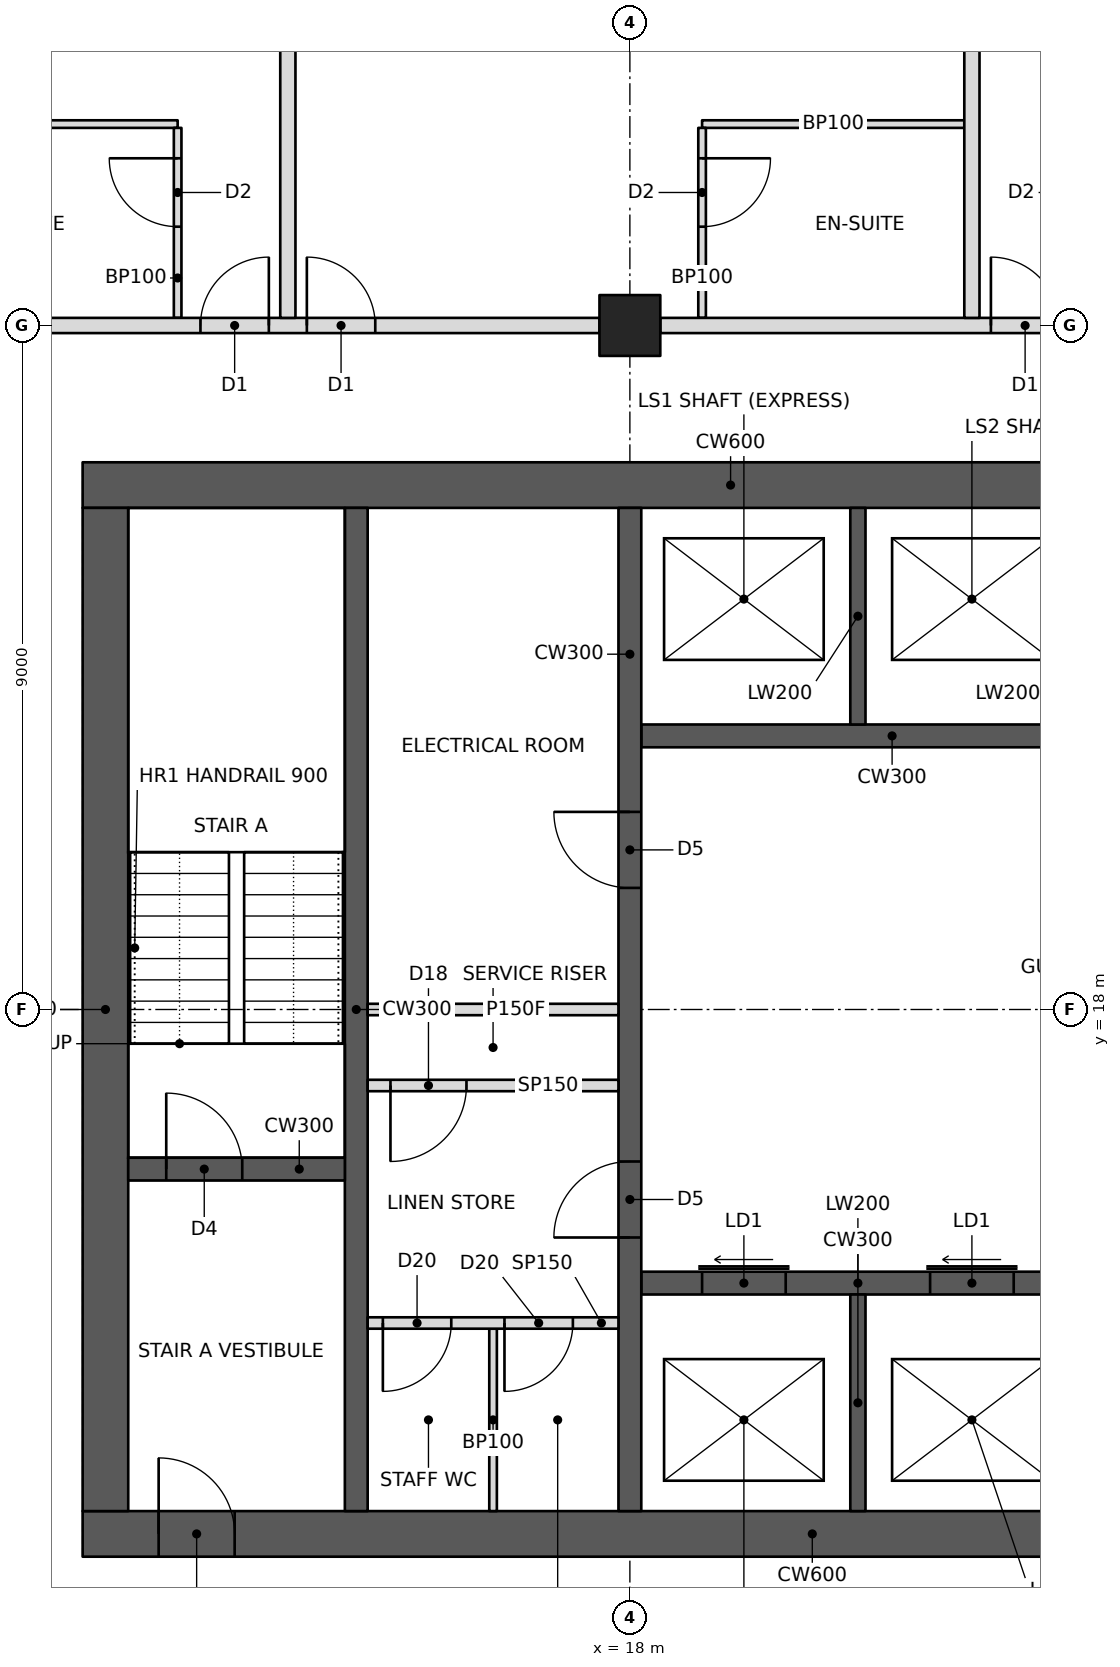
"""IFC4 building model, lengths in metres.
Left out: names, types, materials, properties, quantities, classifications, styles, units other than length and angle.
Written with IfcOpenShell. Run it as: python <this file> out.ifc"""

import sys

from ifc_helpers import new_model, si_unit, direction, frame, frame_2d, origin, origin_2d, place, context, subcontext, project, spatial, rectangle, hollow_rectangle, extrude, element, fill, save


model = new_model("IFC4")
c1 = context("Model", 3, precision=1e-05, world=origin(), true_north=direction((0.0, 1.0)))
c2 = subcontext(c1, "Body", "Model", "MODEL_VIEW")
j1 = project(units=[si_unit("LENGTHUNIT", "METRE"), si_unit("PLANEANGLEUNIT", "RADIAN")], contexts=[c1])
p1 = place(None, origin())
s1 = spatial("IfcSite", under=j1, at=p1, CompositionType="ELEMENT")
p2 = place(p1, origin())
s2 = spatial("IfcBuilding", under=s1, at=p2, CompositionType="ELEMENT")
p3 = place(p2, frame((0.0, 0.0, 51.8)))
s3 = spatial("IfcBuildingStorey", under=s2, at=p3, CompositionType="ELEMENT", Elevation=51.8)
p4 = place(p3, frame((18.0, 27.0, 0.0), z_axis=(0.0, 0.0, 1.0), x_axis=(1.0, 0.0, 0.0)))
e1 = element("IfcColumn", 1, at=p4, inside=s3, PredefinedType="COLUMN", context=c2, shape_type="SweptSolid", body=[
    extrude(hollow_rectangle(XDim=0.8, YDim=0.8, WallThickness=0.1, at=origin_2d()), origin(), (0.0, 0.0, 1.0), 3.4),
])
p5 = place(p3, frame((10.8, 11.1, 0.0), z_axis=(0.0, 0.0, 1.0), x_axis=(1.0, 0.0, 0.0)))
e2 = element("IfcWall", 2, at=p5, inside=s3, PredefinedType="SHEAR", context=c2, shape_type="SweptSolid", body=[
    extrude(rectangle(XDim=23.4, YDim=0.6, at=frame_2d((11.7, 0.0))), origin(), (0.0, 0.0, 1.0), 3.4),
])
p6 = place(p5, frame((1.0, 0.0, 0.0)))
e3 = element("IfcOpeningElement", 3, at=p6, cuts=e2, PredefinedType="OPENING", context=c2, shape_type="SweptSolid", body=[
    extrude(rectangle(XDim=1.0, YDim=2.1, at=frame_2d((0.5, 1.05))), frame((0.0, 0.31, 0.0), z_axis=(0.0, -1.0, 0.0), x_axis=(1.0, 0.0, 0.0)), (0.0, 0.0, 1.0), 0.62),
])
p7 = place(p5, frame((17.2, 0.0, 0.0)))
e4 = element("IfcOpeningElement", 4, at=p7, cuts=e2, PredefinedType="OPENING", context=c2, shape_type="SweptSolid", body=[
    extrude(rectangle(XDim=1.8, YDim=2.1, at=frame_2d((0.9, 1.05))), frame((0.0, 0.31, 0.0), z_axis=(0.0, -1.0, 0.0), x_axis=(1.0, 0.0, 0.0)), (0.0, 0.0, 1.0), 0.62),
])
p8 = place(p3, frame((10.8, 24.9, 0.0), z_axis=(0.0, 0.0, 1.0), x_axis=(1.0, 0.0, 0.0)))
e5 = element("IfcWall", 5, at=p8, inside=s3, PredefinedType="SHEAR", context=c2, shape_type="SweptSolid", body=[
    extrude(rectangle(XDim=23.4, YDim=0.6, at=frame_2d((11.7, 0.0))), origin(), (0.0, 0.0, 1.0), 3.4),
])
p9 = place(p8, frame((17.2, 0.0, 0.0)))
e6 = element("IfcOpeningElement", 6, at=p9, cuts=e5, PredefinedType="OPENING", context=c2, shape_type="SweptSolid", body=[
    extrude(rectangle(XDim=1.8, YDim=2.1, at=frame_2d((0.9, 1.05))), frame((0.0, 0.31, 0.0), z_axis=(0.0, -1.0, 0.0), x_axis=(1.0, 0.0, 0.0)), (0.0, 0.0, 1.0), 0.62),
])
p10 = place(p8, frame((21.1, 0.0, 0.0)))
e7 = element("IfcOpeningElement", 7, at=p10, cuts=e5, PredefinedType="OPENING", context=c2, shape_type="SweptSolid", body=[
    extrude(rectangle(XDim=1.0, YDim=2.1, at=frame_2d((0.5, 1.05))), frame((0.0, 0.31, 0.0), z_axis=(0.0, -1.0, 0.0), x_axis=(1.0, 0.0, 0.0)), (0.0, 0.0, 1.0), 0.62),
])
p11 = place(p3, frame((11.1, 11.4, 0.0), z_axis=(0.0, 0.0, 1.0), x_axis=(0.0, 1.0, 0.0)))
e8 = element("IfcWall", 8, at=p11, inside=s3, PredefinedType="SHEAR", context=c2, shape_type="SweptSolid", body=[
    extrude(rectangle(XDim=13.2, YDim=0.6, at=frame_2d((6.6, 0.0))), origin(), (0.0, 0.0, 1.0), 3.4),
])
p12 = place(p3, frame((14.4, 11.4, 0.0), z_axis=(0.0, 0.0, 1.0), x_axis=(0.0, 1.0, 0.0)))
e9 = element("IfcWall", 9, at=p12, inside=s3, PredefinedType="SHEAR", context=c2, shape_type="SweptSolid", body=[
    extrude(rectangle(XDim=13.2, YDim=0.3, at=frame_2d((6.6, 0.0))), origin(), (0.0, 0.0, 1.0), 3.4),
])
p13 = place(p3, frame((11.4, 15.9, 0.0), z_axis=(0.0, 0.0, 1.0), x_axis=(1.0, 0.0, 0.0)))
e10 = element("IfcWall", 10, at=p13, inside=s3, PredefinedType="SHEAR", context=c2, shape_type="SweptSolid", body=[
    extrude(rectangle(XDim=2.85, YDim=0.3, at=frame_2d((1.425, 0.0))), origin(), (0.0, 0.0, 1.0), 3.4),
])
p14 = place(p13, frame((0.5, 0.0, 0.0)))
e11 = element("IfcOpeningElement", 11, at=p14, cuts=e10, PredefinedType="OPENING", context=c2, shape_type="SweptSolid", body=[
    extrude(rectangle(XDim=1.0, YDim=2.1, at=frame_2d((0.5, 1.05))), frame((0.0, 0.16, 0.0), z_axis=(0.0, -1.0, 0.0), x_axis=(1.0, 0.0, 0.0)), (0.0, 0.0, 1.0), 0.32),
])
p15 = place(p3, frame((18.0, 11.4, 0.0), z_axis=(0.0, 0.0, 1.0), x_axis=(0.0, 1.0, 0.0)))
e12 = element("IfcWall", 12, at=p15, inside=s3, PredefinedType="SHEAR", context=c2, shape_type="SweptSolid", body=[
    extrude(rectangle(XDim=13.2, YDim=0.3, at=frame_2d((6.6, 0.0))), origin(), (0.0, 0.0, 1.0), 3.4),
])
p16 = place(p15, frame((3.6, 0.0, 0.0)))
e13 = element("IfcOpeningElement", 13, at=p16, cuts=e12, PredefinedType="OPENING", context=c2, shape_type="SweptSolid", body=[
    extrude(rectangle(XDim=1.0, YDim=2.1, at=frame_2d((0.5, 1.05))), frame((0.0, 0.16, 0.0), z_axis=(0.0, -1.0, 0.0), x_axis=(1.0, 0.0, 0.0)), (0.0, 0.0, 1.0), 0.32),
])
p17 = place(p15, frame((8.2, 0.0, 0.0)))
e14 = element("IfcOpeningElement", 14, at=p17, cuts=e12, PredefinedType="OPENING", context=c2, shape_type="SweptSolid", body=[
    extrude(rectangle(XDim=1.0, YDim=2.1, at=frame_2d((0.5, 1.05))), frame((0.0, 0.16, 0.0), z_axis=(0.0, -1.0, 0.0), x_axis=(1.0, 0.0, 0.0)), (0.0, 0.0, 1.0), 0.32),
])
p18 = place(p3, frame((14.55, 18.0, 0.0), z_axis=(0.0, 0.0, 1.0), x_axis=(1.0, 0.0, 0.0)))
e15 = element("IfcWall", 15, at=p18, inside=s3, PredefinedType="PARTITIONING", context=c2, shape_type="SweptSolid", body=[
    extrude(rectangle(XDim=3.3, YDim=0.15, at=frame_2d((1.65, 0.0))), origin(), (0.0, 0.0, 1.0), 3.2),
])
p19 = place(p3, frame((18.15, 14.4, 0.0), z_axis=(0.0, 0.0, 1.0), x_axis=(1.0, 0.0, 0.0)))
e16 = element("IfcWall", 16, at=p19, inside=s3, PredefinedType="SHEAR", context=c2, shape_type="SweptSolid", body=[
    extrude(rectangle(XDim=9.0, YDim=0.3, at=frame_2d((4.5, 0.0))), origin(), (0.0, 0.0, 1.0), 3.4),
])
p20 = place(p19, frame((0.8, 0.0, 0.0)))
e17 = element("IfcOpeningElement", 17, at=p20, cuts=e16, PredefinedType="OPENING", context=c2, shape_type="SweptSolid", body=[
    extrude(rectangle(XDim=1.1, YDim=2.1, at=frame_2d((0.55, 1.05))), frame((0.0, 0.16, 0.0), z_axis=(0.0, -1.0, 0.0), x_axis=(1.0, 0.0, 0.0)), (0.0, 0.0, 1.0), 0.32),
])
p21 = place(p19, frame((3.8, 0.0, 0.0)))
e18 = element("IfcOpeningElement", 18, at=p21, cuts=e16, PredefinedType="OPENING", context=c2, shape_type="SweptSolid", body=[
    extrude(rectangle(XDim=1.1, YDim=2.1, at=frame_2d((0.55, 1.05))), frame((0.0, 0.16, 0.0), z_axis=(0.0, -1.0, 0.0), x_axis=(1.0, 0.0, 0.0)), (0.0, 0.0, 1.0), 0.32),
])
p22 = place(p19, frame((6.75, 0.0, 0.0)))
e19 = element("IfcOpeningElement", 19, at=p22, cuts=e16, PredefinedType="OPENING", context=c2, shape_type="SweptSolid", body=[
    extrude(rectangle(XDim=1.2, YDim=2.1, at=frame_2d((0.6, 1.05))), frame((0.0, 0.16, 0.0), z_axis=(0.0, -1.0, 0.0), x_axis=(1.0, 0.0, 0.0)), (0.0, 0.0, 1.0), 0.32),
])
p23 = place(p3, frame((21.0, 11.4, 0.0), z_axis=(0.0, 0.0, 1.0), x_axis=(0.0, 1.0, 0.0)))
e20 = element("IfcWall", 20, at=p23, inside=s3, PredefinedType="SHEAR", context=c2, shape_type="SweptSolid", body=[
    extrude(rectangle(XDim=2.85, YDim=0.2, at=frame_2d((1.425, 0.0))), origin(), (0.0, 0.0, 1.0), 3.4),
])
p24 = place(p3, frame((18.15, 21.6, 0.0), z_axis=(0.0, 0.0, 1.0), x_axis=(1.0, 0.0, 0.0)))
e21 = element("IfcWall", 21, at=p24, inside=s3, PredefinedType="SHEAR", context=c2, shape_type="SweptSolid", body=[
    extrude(rectangle(XDim=9.0, YDim=0.3, at=frame_2d((4.5, 0.0))), origin(), (0.0, 0.0, 1.0), 3.4),
])
p25 = place(p24, frame((6.75, 0.0, 0.0)))
e22 = element("IfcOpeningElement", 22, at=p25, cuts=e21, PredefinedType="OPENING", context=c2, shape_type="SweptSolid", body=[
    extrude(rectangle(XDim=1.2, YDim=2.1, at=frame_2d((0.6, 1.05))), frame((0.0, 0.16, 0.0), z_axis=(0.0, -1.0, 0.0), x_axis=(1.0, 0.0, 0.0)), (0.0, 0.0, 1.0), 0.32),
])
p26 = place(p3, frame((21.0, 21.75, 0.0), z_axis=(0.0, 0.0, 1.0), x_axis=(0.0, 1.0, 0.0)))
e23 = element("IfcWall", 23, at=p26, inside=s3, PredefinedType="SHEAR", context=c2, shape_type="SweptSolid", body=[
    extrude(rectangle(XDim=2.85, YDim=0.2, at=frame_2d((1.425, 0.0))), origin(), (0.0, 0.0, 1.0), 3.4),
])
p27 = place(p3, frame((9.4, 27.0, 0.0), z_axis=(0.0, 0.0, 1.0), x_axis=(1.0, 0.0, 0.0)))
e24 = element("IfcWall", 24, at=p27, inside=s3, PredefinedType="PARTITIONING", context=c2, shape_type="SweptSolid", body=[
    extrude(rectangle(XDim=8.2, YDim=0.2, at=frame_2d((4.1, 0.0))), origin(), (0.0, 0.0, 1.0), 2.405),
])
p28 = place(p27, frame((2.95, 0.0, 0.0)))
e25 = element("IfcOpeningElement", 25, at=p28, cuts=e24, PredefinedType="OPENING", context=c2, shape_type="SweptSolid", body=[
    extrude(rectangle(XDim=0.9, YDim=2.1, at=frame_2d((0.45, 1.05))), frame((0.0, 0.11, 0.0), z_axis=(0.0, -1.0, 0.0), x_axis=(1.0, 0.0, 0.0)), (0.0, 0.0, 1.0), 0.22),
])
p29 = place(p27, frame((4.35, 0.0, 0.0)))
e26 = element("IfcOpeningElement", 26, at=p29, cuts=e24, PredefinedType="OPENING", context=c2, shape_type="SweptSolid", body=[
    extrude(rectangle(XDim=0.9, YDim=2.1, at=frame_2d((0.45, 1.05))), frame((0.0, 0.11, 0.0), z_axis=(0.0, -1.0, 0.0), x_axis=(1.0, 0.0, 0.0)), (0.0, 0.0, 1.0), 0.22),
])
p30 = place(p3, frame((18.4, 27.0, 0.0), z_axis=(0.0, 0.0, 1.0), x_axis=(1.0, 0.0, 0.0)))
e27 = element("IfcWall", 27, at=p30, inside=s3, PredefinedType="PARTITIONING", context=c2, shape_type="SweptSolid", body=[
    extrude(rectangle(XDim=8.2, YDim=0.2, at=frame_2d((4.1, 0.0))), origin(), (0.0, 0.0, 1.0), 2.405),
])
p31 = place(p30, frame((4.35, 0.0, 0.0)))
e28 = element("IfcOpeningElement", 28, at=p31, cuts=e27, PredefinedType="OPENING", context=c2, shape_type="SweptSolid", body=[
    extrude(rectangle(XDim=0.9, YDim=2.1, at=frame_2d((0.45, 1.05))), frame((0.0, 0.11, 0.0), z_axis=(0.0, -1.0, 0.0), x_axis=(1.0, 0.0, 0.0)), (0.0, 0.0, 1.0), 0.22),
])
for number, where, z_axis, x_axis in (
    (29, (13.5, 27.1, 0.0), (0.0, 0.0, 1.0), (0.0, 1.0, 0.0)),
    (30, (22.5, 27.1, 0.0), (0.0, 0.0, 1.0), (0.0, 1.0, 0.0)),
):
    element("IfcWall", number, at=place(p3, frame(where, z_axis=z_axis, x_axis=x_axis)), inside=s3, PredefinedType="PARTITIONING", context=c2, shape_type="SweptSolid", body=[
        extrude(rectangle(XDim=7.9, YDim=0.2, at=frame_2d((3.95, 0.0))), origin(), (0.0, 0.0, 1.0), 2.404),
    ])
p32 = place(p3, frame((9.1, 29.65, 0.0), z_axis=(0.0, 0.0, 1.0), x_axis=(1.0, 0.0, 0.0)))
e31 = element("IfcWall", 31, at=p32, inside=s3, PredefinedType="PARTITIONING", context=c2, shape_type="SweptSolid", body=[
    extrude(rectangle(XDim=2.95, YDim=0.1, at=frame_2d((1.475, 0.0))), origin(), (0.0, 0.0, 1.0), 2.438),
])
p33 = place(p3, frame((12.05, 27.1, 0.0), z_axis=(0.0, 0.0, 1.0), x_axis=(0.0, 1.0, 0.0)))
e32 = element("IfcWall", 32, at=p33, inside=s3, PredefinedType="PARTITIONING", context=c2, shape_type="SweptSolid", body=[
    extrude(rectangle(XDim=2.5, YDim=0.1, at=frame_2d((1.25, 0.0))), origin(), (0.0, 0.0, 1.0), 2.404),
])
p34 = place(p33, frame((1.2, 0.0, 0.0)))
e33 = element("IfcOpeningElement", 33, at=p34, cuts=e32, PredefinedType="OPENING", context=c2, shape_type="SweptSolid", body=[
    extrude(rectangle(XDim=0.9, YDim=2.1, at=frame_2d((0.45, 1.05))), frame((0.0, 0.06, 0.0), z_axis=(0.0, -1.0, 0.0), x_axis=(1.0, 0.0, 0.0)), (0.0, 0.0, 1.0), 0.12),
])
p35 = place(p3, frame((18.95, 29.65, 0.0), z_axis=(0.0, 0.0, 1.0), x_axis=(1.0, 0.0, 0.0)))
e34 = element("IfcWall", 34, at=p35, inside=s3, PredefinedType="PARTITIONING", context=c2, shape_type="SweptSolid", body=[
    extrude(rectangle(XDim=3.45, YDim=0.1, at=frame_2d((1.725, 0.0))), origin(), (0.0, 0.0, 1.0), 3.2),
])
p36 = place(p3, frame((18.95, 27.1, 0.0), z_axis=(0.0, 0.0, 1.0), x_axis=(0.0, 1.0, 0.0)))
e35 = element("IfcWall", 35, at=p36, inside=s3, PredefinedType="PARTITIONING", context=c2, shape_type="SweptSolid", body=[
    extrude(rectangle(XDim=2.5, YDim=0.1, at=frame_2d((1.25, 0.0))), origin(), (0.0, 0.0, 1.0), 2.404),
])
p37 = place(p36, frame((1.2, 0.0, 0.0)))
e36 = element("IfcOpeningElement", 36, at=p37, cuts=e35, PredefinedType="OPENING", context=c2, shape_type="SweptSolid", body=[
    extrude(rectangle(XDim=0.9, YDim=2.1, at=frame_2d((0.45, 1.05))), frame((0.0, 0.06, 0.0), z_axis=(0.0, -1.0, 0.0), x_axis=(1.0, 0.0, 0.0)), (0.0, 0.0, 1.0), 0.12),
])
p38 = place(p3, frame((14.55, 17.0, 0.0), z_axis=(0.0, 0.0, 1.0), x_axis=(1.0, 0.0, 0.0)))
e37 = element("IfcWall", 37, at=p38, inside=s3, PredefinedType="PARTITIONING", context=c2, shape_type="SweptSolid", body=[
    extrude(rectangle(XDim=3.3, YDim=0.15, at=frame_2d((1.65, 0.0))), origin(), (0.0, 0.0, 1.0), 3.2),
])
p39 = place(p38, frame((0.3, 0.0, 0.0)))
e38 = element("IfcOpeningElement", 38, at=p39, cuts=e37, PredefinedType="OPENING", context=c2, shape_type="SweptSolid", body=[
    extrude(rectangle(XDim=1.0, YDim=2.1, at=frame_2d((0.5, 1.05))), frame((0.0, 0.085, 0.0), z_axis=(0.0, -1.0, 0.0), x_axis=(1.0, 0.0, 0.0)), (0.0, 0.0, 1.0), 0.17),
])
p40 = place(p3, frame((14.55, 13.875, 0.0), z_axis=(0.0, 0.0, 1.0), x_axis=(1.0, 0.0, 0.0)))
e39 = element("IfcWall", 39, at=p40, inside=s3, PredefinedType="PARTITIONING", context=c2, shape_type="SweptSolid", body=[
    extrude(rectangle(XDim=3.3, YDim=0.15, at=frame_2d((1.65, 0.0))), origin(), (0.0, 0.0, 1.0), 3.2),
])
p41 = place(p40, frame((0.2, 0.0, 0.0)))
e40 = element("IfcOpeningElement", 40, at=p41, cuts=e39, PredefinedType="OPENING", context=c2, shape_type="SweptSolid", body=[
    extrude(rectangle(XDim=0.9, YDim=2.1, at=frame_2d((0.45, 1.05))), frame((0.0, 0.085, 0.0), z_axis=(0.0, -1.0, 0.0), x_axis=(1.0, 0.0, 0.0)), (0.0, 0.0, 1.0), 0.17),
])
p42 = place(p40, frame((1.8, 0.0, 0.0)))
e41 = element("IfcOpeningElement", 41, at=p42, cuts=e39, PredefinedType="OPENING", context=c2, shape_type="SweptSolid", body=[
    extrude(rectangle(XDim=0.9, YDim=2.1, at=frame_2d((0.45, 1.05))), frame((0.0, 0.085, 0.0), z_axis=(0.0, -1.0, 0.0), x_axis=(1.0, 0.0, 0.0)), (0.0, 0.0, 1.0), 0.17),
])
p43 = place(p3, frame((16.2, 11.4, 0.0), z_axis=(0.0, 0.0, 1.0), x_axis=(0.0, 1.0, 0.0)))
e42 = element("IfcWall", 42, at=p43, inside=s3, PredefinedType="PARTITIONING", context=c2, shape_type="SweptSolid", body=[
    extrude(rectangle(XDim=2.4, YDim=0.1, at=frame_2d((1.2, 0.0))), origin(), (0.0, 0.0, 1.0), 3.2),
])
p44 = place(p34, origin())
e43 = element("IfcDoor", 43, at=p44, inside=s3, OperationType="SINGLE_SWING_RIGHT", PredefinedType="DOOR", context=c2, shape_type="SweptSolid", body=[
    extrude(rectangle(XDim=0.9, YDim=2.1, at=frame_2d((0.45, 1.05))), frame((0.0, 0.025, 0.0), z_axis=(0.0, -1.0, 0.0), x_axis=(1.0, 0.0, 0.0)), (0.0, 0.0, 1.0), 0.05),
])
fill(e33, e43)
p45 = place(p28, origin())
e44 = element("IfcDoor", 44, at=p45, inside=s3, OperationType="SINGLE_SWING_RIGHT", PredefinedType="DOOR", context=c2, shape_type="SweptSolid", body=[
    extrude(rectangle(XDim=0.9, YDim=2.1, at=frame_2d((0.45, 1.05))), frame((0.0, 0.025, 0.0), z_axis=(0.0, -1.0, 0.0), x_axis=(1.0, 0.0, 0.0)), (0.0, 0.0, 1.0), 0.05),
])
fill(e25, e44)
p46 = place(p37, frame((0.9, 0.0, 0.0), z_axis=(0.0, 0.0, 1.0), x_axis=(-1.0, 0.0, 0.0)))
e45 = element("IfcDoor", 45, at=p46, inside=s3, OperationType="SINGLE_SWING_LEFT", PredefinedType="DOOR", context=c2, shape_type="SweptSolid", body=[
    extrude(rectangle(XDim=0.9, YDim=2.1, at=frame_2d((0.45, 1.05))), frame((0.0, 0.025, 0.0), z_axis=(0.0, -1.0, 0.0), x_axis=(1.0, 0.0, 0.0)), (0.0, 0.0, 1.0), 0.05),
])
fill(e36, e45)
p47 = place(p29, origin())
e46 = element("IfcDoor", 46, at=p47, inside=s3, OperationType="SINGLE_SWING_LEFT", PredefinedType="DOOR", context=c2, shape_type="SweptSolid", body=[
    extrude(rectangle(XDim=0.9, YDim=2.1, at=frame_2d((0.45, 1.05))), frame((0.0, 0.025, 0.0), z_axis=(0.0, -1.0, 0.0), x_axis=(1.0, 0.0, 0.0)), (0.0, 0.0, 1.0), 0.05),
])
fill(e26, e46)
p48 = place(p31, origin())
e47 = element("IfcDoor", 47, at=p48, inside=s3, OperationType="SINGLE_SWING_LEFT", PredefinedType="DOOR", context=c2, shape_type="SweptSolid", body=[
    extrude(rectangle(XDim=0.9, YDim=2.1, at=frame_2d((0.45, 1.05))), frame((0.0, 0.025, 0.0), z_axis=(0.0, -1.0, 0.0), x_axis=(1.0, 0.0, 0.0)), (0.0, 0.0, 1.0), 0.05),
])
fill(e28, e47)
p49 = place(p39, frame((1.0, 0.0, 0.0), z_axis=(0.0, 0.0, 1.0), x_axis=(-1.0, 0.0, 0.0)))
e48 = element("IfcDoor", 48, at=p49, inside=s3, OperationType="SINGLE_SWING_RIGHT", PredefinedType="DOOR", context=c2, shape_type="SweptSolid", body=[
    extrude(rectangle(XDim=1.0, YDim=2.1, at=frame_2d((0.5, 1.05))), frame((0.0, 0.025, 0.0), z_axis=(0.0, -1.0, 0.0), x_axis=(1.0, 0.0, 0.0)), (0.0, 0.0, 1.0), 0.05),
])
fill(e38, e48)
p50 = place(p41, frame((0.9, 0.0, 0.0), z_axis=(0.0, 0.0, 1.0), x_axis=(-1.0, 0.0, 0.0)))
e49 = element("IfcDoor", 49, at=p50, inside=s3, OperationType="SINGLE_SWING_RIGHT", PredefinedType="DOOR", context=c2, shape_type="SweptSolid", body=[
    extrude(rectangle(XDim=0.9, YDim=2.1, at=frame_2d((0.45, 1.05))), frame((0.0, 0.025, 0.0), z_axis=(0.0, -1.0, 0.0), x_axis=(1.0, 0.0, 0.0)), (0.0, 0.0, 1.0), 0.05),
])
fill(e40, e49)
p51 = place(p42, frame((0.9, 0.0, 0.0), z_axis=(0.0, 0.0, 1.0), x_axis=(-1.0, 0.0, 0.0)))
e50 = element("IfcDoor", 50, at=p51, inside=s3, OperationType="SINGLE_SWING_RIGHT", PredefinedType="DOOR", context=c2, shape_type="SweptSolid", body=[
    extrude(rectangle(XDim=0.9, YDim=2.1, at=frame_2d((0.45, 1.05))), frame((0.0, 0.025, 0.0), z_axis=(0.0, -1.0, 0.0), x_axis=(1.0, 0.0, 0.0)), (0.0, 0.0, 1.0), 0.05),
])
fill(e41, e50)
p52 = place(p6, origin())
e51 = element("IfcDoor", 51, at=p52, inside=s3, OperationType="SINGLE_SWING_LEFT", PredefinedType="DOOR", context=c2, shape_type="SweptSolid", body=[
    extrude(rectangle(XDim=1.0, YDim=2.1, at=frame_2d((0.5, 1.05))), frame((0.0, 0.025, 0.0), z_axis=(0.0, -1.0, 0.0), x_axis=(1.0, 0.0, 0.0)), (0.0, 0.0, 1.0), 0.05),
])
fill(e3, e51)
p53 = place(p14, origin())
e52 = element("IfcDoor", 52, at=p53, inside=s3, OperationType="SINGLE_SWING_LEFT", PredefinedType="DOOR", context=c2, shape_type="SweptSolid", body=[
    extrude(rectangle(XDim=1.0, YDim=2.1, at=frame_2d((0.5, 1.05))), frame((0.0, 0.025, 0.0), z_axis=(0.0, -1.0, 0.0), x_axis=(1.0, 0.0, 0.0)), (0.0, 0.0, 1.0), 0.05),
])
fill(e11, e52)
p54 = place(p16, origin())
e53 = element("IfcDoor", 53, at=p54, inside=s3, OperationType="SINGLE_SWING_LEFT", PredefinedType="DOOR", context=c2, shape_type="SweptSolid", body=[
    extrude(rectangle(XDim=1.0, YDim=2.1, at=frame_2d((0.5, 1.05))), frame((0.0, 0.025, 0.0), z_axis=(0.0, -1.0, 0.0), x_axis=(1.0, 0.0, 0.0)), (0.0, 0.0, 1.0), 0.05),
])
fill(e13, e53)
p55 = place(p17, origin())
e54 = element("IfcDoor", 54, at=p55, inside=s3, OperationType="SINGLE_SWING_RIGHT", PredefinedType="DOOR", context=c2, shape_type="SweptSolid", body=[
    extrude(rectangle(XDim=1.0, YDim=2.1, at=frame_2d((0.5, 1.05))), frame((0.0, 0.025, 0.0), z_axis=(0.0, -1.0, 0.0), x_axis=(1.0, 0.0, 0.0)), (0.0, 0.0, 1.0), 0.05),
])
fill(e14, e54)
p56 = place(p20, origin())
e55 = element("IfcDoor", 55, at=p56, inside=s3, OperationType="SLIDING_TO_LEFT", PredefinedType="DOOR", context=c2, shape_type="SweptSolid", body=[
    extrude(rectangle(XDim=1.1, YDim=2.1, at=frame_2d((0.55, 1.05))), frame((0.0, 0.025, 0.0), z_axis=(0.0, -1.0, 0.0), x_axis=(1.0, 0.0, 0.0)), (0.0, 0.0, 1.0), 0.05),
])
fill(e17, e55)
p57 = place(p21, origin())
e56 = element("IfcDoor", 56, at=p57, inside=s3, OperationType="SLIDING_TO_LEFT", PredefinedType="DOOR", context=c2, shape_type="SweptSolid", body=[
    extrude(rectangle(XDim=1.1, YDim=2.1, at=frame_2d((0.55, 1.05))), frame((0.0, 0.025, 0.0), z_axis=(0.0, -1.0, 0.0), x_axis=(1.0, 0.0, 0.0)), (0.0, 0.0, 1.0), 0.05),
])
fill(e18, e56)
save(model, sys.argv[1])
